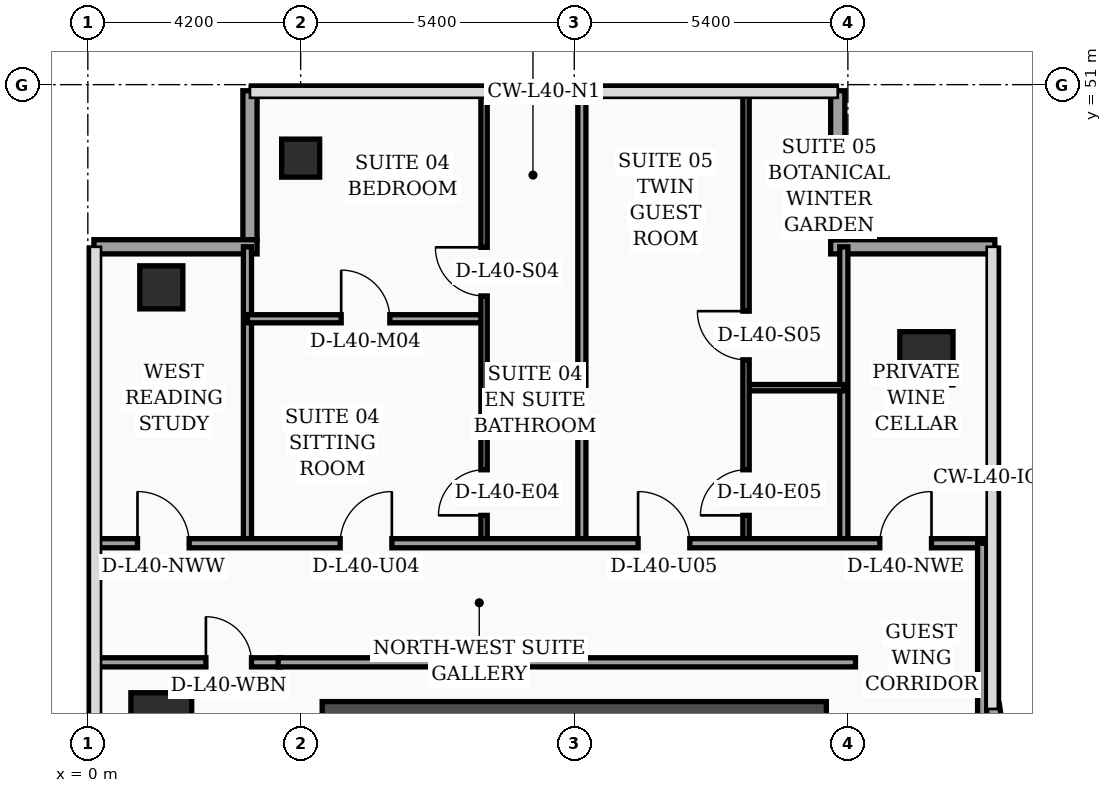
"""IFC4 building model, lengths in metres.
Left out: names, types, materials, properties, quantities, classifications, styles, units other than length and angle.
Written with IfcOpenShell. Run it as: python <this file> out.ifc"""

import sys

from ifc_helpers import new_model, si_unit, direction, frame, frame_2d, origin, origin_2d, place, context, subcontext, project, spatial, rectangle, hollow_rectangle, extrude, element, fill, save


model = new_model("IFC4")
c1 = context("Model", 3, precision=1e-05, world=origin(), true_north=direction((0.0, 1.0)))
c2 = subcontext(c1, "Body", "Model", "MODEL_VIEW")
j1 = project(units=[si_unit("LENGTHUNIT", "METRE"), si_unit("PLANEANGLEUNIT", "RADIAN")], contexts=[c1])
p1 = place(None, origin())
s1 = spatial("IfcSite", under=j1, at=p1, CompositionType="ELEMENT")
p2 = place(p1, origin())
s2 = spatial("IfcBuilding", under=s1, at=p2, CompositionType="ELEMENT")
p3 = place(p2, frame((0.0, 0.0, 163.7)))
s3 = spatial("IfcBuildingStorey", under=s2, at=p3, CompositionType="ELEMENT", Elevation=163.7)
p4 = place(p3, frame((4.625, 38.4, 0.0), z_axis=(0.0, 0.0, 1.0), x_axis=(1.0, 0.0, 0.0)))
e1 = element("IfcWall", 1, at=p4, inside=s3, PredefinedType="SHEAR", context=c2, shape_type="SweptSolid", body=[
    extrude(rectangle(XDim=9.95, YDim=0.85, at=frame_2d((4.975, 0.0))), origin(), (0.0, 0.0, 1.0), 3.56),
])
p5 = place(p3, frame((1.45, 38.4, 0.0), z_axis=(0.0, 0.0, 1.0), x_axis=(1.0, 0.0, 0.0)))
e2 = element("IfcColumn", 2, at=p5, inside=s3, PredefinedType="COLUMN", context=c2, shape_type="SweptSolid", body=[
    extrude(rectangle(XDim=1.2, YDim=1.2, at=origin_2d()), origin(), (0.0, 0.0, 1.0), 3.56),
])
p6 = place(p3, frame((1.45, 47.0, 0.0), z_axis=(0.0, 0.0, 1.0), x_axis=(1.0, 0.0, 0.0)))
e3 = element("IfcColumn", 3, at=p6, inside=s3, PredefinedType="COLUMN", context=c2, shape_type="SweptSolid", body=[
    extrude(hollow_rectangle(XDim=0.85, YDim=0.85, WallThickness=0.036, at=origin_2d()), origin(), (0.0, 0.0, 1.0), 3.56),
])
p7 = place(p3, frame((4.2, 49.55, 0.0), z_axis=(0.0, 0.0, 1.0), x_axis=(1.0, 0.0, 0.0)))
e4 = element("IfcColumn", 4, at=p7, inside=s3, PredefinedType="COLUMN", context=c2, shape_type="SweptSolid", body=[
    extrude(hollow_rectangle(XDim=0.75, YDim=0.75, WallThickness=0.032, at=origin_2d()), origin(), (0.0, 0.0, 1.0), 3.56),
])
p8 = place(p3, frame((16.55, 45.6, 0.0), z_axis=(0.0, 0.0, 1.0), x_axis=(1.0, 0.0, 0.0)))
e5 = element("IfcColumn", 5, at=p8, inside=s3, PredefinedType="COLUMN", context=c2, shape_type="SweptSolid", body=[
    extrude(rectangle(XDim=1.05, YDim=1.05, at=origin_2d()), origin(), (0.0, 0.0, 1.0), 3.56),
])
p9 = place(p3, frame((17.962, 38.03, 0.0), z_axis=(0.0, 0.0, 1.0), x_axis=(-0.15141125477, 0.988470855377, 0.0)))
e6 = element("IfcWall", 6, at=p9, inside=s3, PredefinedType="SOLIDWALL", context=c2, shape_type="SweptSolid", body=[
    extrude(rectangle(XDim=0.739, YDim=0.28, at=frame_2d((0.369, 0.0))), origin(), (0.0, 0.0, 1.0), 3.56),
])
p10 = place(p3, frame((17.9, 47.8, 0.0), z_axis=(0.0, 0.0, 1.0), x_axis=(-1.0, 0.0, 0.0)))
e7 = element("IfcWall", 7, at=p10, inside=s3, PredefinedType="SOLIDWALL", context=c2, shape_type="SweptSolid", body=[
    extrude(rectangle(XDim=3.24, YDim=0.28, at=frame_2d((1.62, 0.0))), origin(), (0.0, 0.0, 1.0), 3.56),
])
p11 = place(p3, frame((14.8, 47.94, 0.0), z_axis=(0.0, 0.0, 1.0), x_axis=(0.0, 1.0, 0.0)))
e8 = element("IfcWall", 8, at=p11, inside=s3, PredefinedType="SOLIDWALL", context=c2, shape_type="SweptSolid", body=[
    extrude(rectangle(XDim=2.94, YDim=0.28, at=frame_2d((1.47, 0.0))), origin(), (0.0, 0.0, 1.0), 3.56),
])
p12 = place(p3, frame((3.2, 50.88, 0.0), z_axis=(0.0, 0.0, 1.0), x_axis=(0.0, -1.0, 0.0)))
e9 = element("IfcWall", 9, at=p12, inside=s3, PredefinedType="SOLIDWALL", context=c2, shape_type="SweptSolid", body=[
    extrude(rectangle(XDim=2.94, YDim=0.28, at=frame_2d((1.47, 0.0))), origin(), (0.0, 0.0, 1.0), 3.04),
])
p13 = place(p3, frame((3.34, 47.8, 0.0), z_axis=(0.0, 0.0, 1.0), x_axis=(-1.0, 0.0, 0.0)))
e10 = element("IfcWall", 10, at=p13, inside=s3, PredefinedType="SOLIDWALL", context=c2, shape_type="SweptSolid", body=[
    extrude(rectangle(XDim=3.22, YDim=0.28, at=frame_2d((1.61, 0.0))), origin(), (0.0, 0.0, 1.0), 3.04),
])
p14 = place(p3, frame((0.08, 39.6, 0.0), z_axis=(0.0, 0.0, 1.0), x_axis=(1.0, 0.0, 0.0)))
e11 = element("IfcWall", 11, at=p14, inside=s3, PredefinedType="PARTITIONING", context=c2, shape_type="SweptSolid", body=[
    extrude(rectangle(XDim=3.725, YDim=0.18, at=frame_2d((1.862, 0.0))), origin(), (0.0, 0.0, 1.0), 2.94),
])
p15 = place(p14, frame((2.25, 0.0, 0.0)))
e12 = element("IfcOpeningElement", 12, at=p15, cuts=e11, PredefinedType="OPENING", context=c2, shape_type="SweptSolid", body=[
    extrude(rectangle(XDim=0.9, YDim=2.15, at=frame_2d((0.45, 1.075))), frame((0.0, 0.1, 0.0), z_axis=(0.0, -1.0, 0.0), x_axis=(1.0, 0.0, 0.0)), (0.0, 0.0, 1.0), 0.2),
])
p16 = place(p3, frame((3.15, 41.95, 0.0), z_axis=(0.0, 0.0, 1.0), x_axis=(0.0, 1.0, 0.0)))
e13 = element("IfcWall", 13, at=p16, inside=s3, PredefinedType="PARTITIONING", context=c2, shape_type="SweptSolid", body=[
    extrude(rectangle(XDim=5.85, YDim=0.16, at=frame_2d((2.925, 0.0))), origin(), (0.0, 0.0, 1.0), 3.14),
])
p17 = place(p3, frame((14.92, 41.95, 0.0), z_axis=(0.0, 0.0, 1.0), x_axis=(0.0, 1.0, 0.0)))
e14 = element("IfcWall", 14, at=p17, inside=s3, PredefinedType="PARTITIONING", context=c2, shape_type="SweptSolid", body=[
    extrude(rectangle(XDim=5.85, YDim=0.16, at=frame_2d((2.925, 0.0))), origin(), (0.0, 0.0, 1.0), 3.04),
])
p18 = place(p3, frame((7.82, 45.02, 0.0), z_axis=(0.0, 0.0, 1.0), x_axis=(1.0, 0.0, 0.0)))
e15 = element("IfcWall", 15, at=p18, inside=s3, PredefinedType="PARTITIONING", context=c2, shape_type="SweptSolid", body=[
    extrude(rectangle(XDim=1.93, YDim=0.125, at=frame_2d((0.965, 0.0))), origin(), (0.0, 0.0, 1.0), 3.56),
])
p19 = place(p3, frame((3.15, 46.38, 0.0), z_axis=(0.0, 0.0, 1.0), x_axis=(1.0, 0.0, 0.0)))
e16 = element("IfcWall", 16, at=p19, inside=s3, PredefinedType="PARTITIONING", context=c2, shape_type="SweptSolid", body=[
    extrude(rectangle(XDim=4.67, YDim=0.16, at=frame_2d((2.335, 0.0))), origin(), (0.0, 0.0, 1.0), 2.94),
])
p20 = place(p19, frame((1.85, 0.0, 0.0)))
e17 = element("IfcOpeningElement", 17, at=p20, cuts=e16, PredefinedType="OPENING", context=c2, shape_type="SweptSolid", body=[
    extrude(rectangle(XDim=0.96, YDim=2.2, at=frame_2d((0.48, 1.1))), frame((0.0, 0.09, 0.0), z_axis=(0.0, -1.0, 0.0), x_axis=(1.0, 0.0, 0.0)), (0.0, 0.0, 1.0), 0.18),
])
p21 = place(p3, frame((7.82, 41.95, 0.0), z_axis=(0.0, 0.0, 1.0), x_axis=(0.0, 1.0, 0.0)))
e18 = element("IfcWall", 18, at=p21, inside=s3, PredefinedType="PARTITIONING", context=c2, shape_type="SweptSolid", body=[
    extrude(rectangle(XDim=8.99, YDim=0.125, at=frame_2d((4.495, 0.0))), origin(), (0.0, 0.0, 1.0), 3.04),
])
p22 = place(p21, frame((0.55, 0.0, 0.0)))
e19 = element("IfcOpeningElement", 19, at=p22, cuts=e18, PredefinedType="OPENING", context=c2, shape_type="SweptSolid", body=[
    extrude(rectangle(XDim=0.9, YDim=2.15, at=frame_2d((0.45, 1.075))), frame((0.0, 0.073, 0.0), z_axis=(0.0, -1.0, 0.0), x_axis=(1.0, 0.0, 0.0)), (0.0, 0.0, 1.0), 0.145),
])
p23 = place(p21, frame((4.88, 0.0, 0.0)))
e20 = element("IfcOpeningElement", 20, at=p23, cuts=e18, PredefinedType="OPENING", context=c2, shape_type="SweptSolid", body=[
    extrude(rectangle(XDim=0.96, YDim=2.2, at=frame_2d((0.48, 1.1))), frame((0.0, 0.073, 0.0), z_axis=(0.0, -1.0, 0.0), x_axis=(1.0, 0.0, 0.0)), (0.0, 0.0, 1.0), 0.145),
])
p24 = place(p3, frame((12.99, 45.02, 0.0), z_axis=(0.0, 0.0, 1.0), x_axis=(1.0, 0.0, 0.0)))
e21 = element("IfcWall", 21, at=p24, inside=s3, PredefinedType="PARTITIONING", context=c2, shape_type="SweptSolid", body=[
    extrude(rectangle(XDim=1.93, YDim=0.125, at=frame_2d((0.965, 0.0))), origin(), (0.0, 0.0, 1.0), 3.56),
])
p25 = place(p3, frame((12.99, 41.95, 0.0), z_axis=(0.0, 0.0, 1.0), x_axis=(0.0, 1.0, 0.0)))
e22 = element("IfcWall", 22, at=p25, inside=s3, PredefinedType="PARTITIONING", context=c2, shape_type="SweptSolid", body=[
    extrude(rectangle(XDim=8.99, YDim=0.125, at=frame_2d((4.495, 0.0))), origin(), (0.0, 0.0, 1.0), 3.04),
])
p26 = place(p25, frame((0.55, 0.0, 0.0)))
e23 = element("IfcOpeningElement", 23, at=p26, cuts=e22, PredefinedType="OPENING", context=c2, shape_type="SweptSolid", body=[
    extrude(rectangle(XDim=0.9, YDim=2.15, at=frame_2d((0.45, 1.075))), frame((0.0, 0.073, 0.0), z_axis=(0.0, -1.0, 0.0), x_axis=(1.0, 0.0, 0.0)), (0.0, 0.0, 1.0), 0.145),
])
p27 = place(p25, frame((3.62, 0.0, 0.0)))
e24 = element("IfcOpeningElement", 24, at=p27, cuts=e22, PredefinedType="OPENING", context=c2, shape_type="SweptSolid", body=[
    extrude(rectangle(XDim=0.96, YDim=2.2, at=frame_2d((0.48, 1.1))), frame((0.0, 0.073, 0.0), z_axis=(0.0, -1.0, 0.0), x_axis=(1.0, 0.0, 0.0)), (0.0, 0.0, 1.0), 0.145),
])
p28 = place(p3, frame((9.75, 41.95, 0.0), z_axis=(0.0, 0.0, 1.0), x_axis=(0.0, 1.0, 0.0)))
e25 = element("IfcWall", 25, at=p28, inside=s3, PredefinedType="PARTITIONING", context=c2, shape_type="SweptSolid", body=[
    extrude(rectangle(XDim=8.99, YDim=0.16, at=frame_2d((4.495, 0.0))), origin(), (0.0, 0.0, 1.0), 3.04),
])
p29 = place(p3, frame((0.08, 41.95, 0.0), z_axis=(0.0, 0.0, 1.0), x_axis=(1.0, 0.0, 0.0)))
e26 = element("IfcWall", 26, at=p29, inside=s3, PredefinedType="PARTITIONING", context=c2, shape_type="SweptSolid", body=[
    extrude(rectangle(XDim=17.77, YDim=0.18, at=frame_2d((8.885, 0.0))), origin(), (0.0, 0.0, 1.0), 2.94),
])
p30 = place(p29, frame((0.9, 0.0, 0.0)))
e27 = element("IfcOpeningElement", 27, at=p30, cuts=e26, PredefinedType="OPENING", context=c2, shape_type="SweptSolid", body=[
    extrude(rectangle(XDim=1.02, YDim=2.2, at=frame_2d((0.51, 1.1))), frame((0.0, 0.1, 0.0), z_axis=(0.0, -1.0, 0.0), x_axis=(1.0, 0.0, 0.0)), (0.0, 0.0, 1.0), 0.2),
])
p31 = place(p29, frame((4.9, 0.0, 0.0)))
e28 = element("IfcOpeningElement", 28, at=p31, cuts=e26, PredefinedType="OPENING", context=c2, shape_type="SweptSolid", body=[
    extrude(rectangle(XDim=1.02, YDim=2.2, at=frame_2d((0.51, 1.1))), frame((0.0, 0.1, 0.0), z_axis=(0.0, -1.0, 0.0), x_axis=(1.0, 0.0, 0.0)), (0.0, 0.0, 1.0), 0.2),
])
p32 = place(p29, frame((10.78, 0.0, 0.0)))
e29 = element("IfcOpeningElement", 29, at=p32, cuts=e26, PredefinedType="OPENING", context=c2, shape_type="SweptSolid", body=[
    extrude(rectangle(XDim=1.02, YDim=2.2, at=frame_2d((0.51, 1.1))), frame((0.0, 0.1, 0.0), z_axis=(0.0, -1.0, 0.0), x_axis=(1.0, 0.0, 0.0)), (0.0, 0.0, 1.0), 0.2),
])
p33 = place(p29, frame((15.55, 0.0, 0.0)))
e30 = element("IfcOpeningElement", 30, at=p33, cuts=e26, PredefinedType="OPENING", context=c2, shape_type="SweptSolid", body=[
    extrude(rectangle(XDim=1.02, YDim=2.2, at=frame_2d((0.51, 1.1))), frame((0.0, 0.1, 0.0), z_axis=(0.0, -1.0, 0.0), x_axis=(1.0, 0.0, 0.0)), (0.0, 0.0, 1.0), 0.2),
])
p34 = place(p3, frame((17.65, 24.3, 0.0), z_axis=(0.0, 0.0, 1.0), x_axis=(0.0, 1.0, 0.0)))
e31 = element("IfcWall", 31, at=p34, inside=s3, PredefinedType="PARTITIONING", context=c2, shape_type="SweptSolid", body=[
    extrude(rectangle(XDim=17.65, YDim=0.18, at=frame_2d((8.825, 0.0))), origin(), (0.0, 0.0, 1.0), 2.94),
])
p35 = place(p3, frame((3.755, 39.6, 0.0), z_axis=(0.0, 0.0, 1.0), x_axis=(1.0, 0.0, 0.0)))
e32 = element("IfcWall", 32, at=p35, inside=s3, PredefinedType="PARTITIONING", context=c2, shape_type="SweptSolid", body=[
    extrude(rectangle(XDim=11.395, YDim=0.18, at=frame_2d((5.698, 0.0))), origin(), (0.0, 0.0, 1.0), 2.94),
])
p36 = place(p15, origin())
e33 = element("IfcDoor", 33, at=p36, inside=s3, OperationType="SINGLE_SWING_LEFT", PredefinedType="DOOR", context=c2, shape_type="SweptSolid", body=[
    extrude(rectangle(XDim=0.9, YDim=2.15, at=frame_2d((0.45, 1.075))), frame((0.0, 0.025, 0.0), z_axis=(0.0, -1.0, 0.0), x_axis=(1.0, 0.0, 0.0)), (0.0, 0.0, 1.0), 0.05),
])
fill(e12, e33)
p37 = place(p20, origin())
e34 = element("IfcDoor", 34, at=p37, inside=s3, OperationType="SINGLE_SWING_LEFT", PredefinedType="DOOR", context=c2, shape_type="SweptSolid", body=[
    extrude(rectangle(XDim=0.96, YDim=2.2, at=frame_2d((0.48, 1.1))), frame((0.0, 0.025, 0.0), z_axis=(0.0, -1.0, 0.0), x_axis=(1.0, 0.0, 0.0)), (0.0, 0.0, 1.0), 0.05),
])
fill(e17, e34)
p38 = place(p22, origin())
e35 = element("IfcDoor", 35, at=p38, inside=s3, OperationType="SINGLE_SWING_LEFT", PredefinedType="DOOR", context=c2, shape_type="SweptSolid", body=[
    extrude(rectangle(XDim=0.9, YDim=2.15, at=frame_2d((0.45, 1.075))), frame((0.0, 0.025, 0.0), z_axis=(0.0, -1.0, 0.0), x_axis=(1.0, 0.0, 0.0)), (0.0, 0.0, 1.0), 0.05),
])
fill(e19, e35)
p39 = place(p23, origin())
e36 = element("IfcDoor", 36, at=p39, inside=s3, OperationType="SINGLE_SWING_RIGHT", PredefinedType="DOOR", context=c2, shape_type="SweptSolid", body=[
    extrude(rectangle(XDim=0.96, YDim=2.2, at=frame_2d((0.48, 1.1))), frame((0.0, 0.025, 0.0), z_axis=(0.0, -1.0, 0.0), x_axis=(1.0, 0.0, 0.0)), (0.0, 0.0, 1.0), 0.05),
])
fill(e20, e36)
p40 = place(p26, origin())
e37 = element("IfcDoor", 37, at=p40, inside=s3, OperationType="SINGLE_SWING_LEFT", PredefinedType="DOOR", context=c2, shape_type="SweptSolid", body=[
    extrude(rectangle(XDim=0.9, YDim=2.15, at=frame_2d((0.45, 1.075))), frame((0.0, 0.025, 0.0), z_axis=(0.0, -1.0, 0.0), x_axis=(1.0, 0.0, 0.0)), (0.0, 0.0, 1.0), 0.05),
])
fill(e23, e37)
p41 = place(p27, origin())
e38 = element("IfcDoor", 38, at=p41, inside=s3, OperationType="SINGLE_SWING_RIGHT", PredefinedType="DOOR", context=c2, shape_type="SweptSolid", body=[
    extrude(rectangle(XDim=0.96, YDim=2.2, at=frame_2d((0.48, 1.1))), frame((0.0, 0.025, 0.0), z_axis=(0.0, -1.0, 0.0), x_axis=(1.0, 0.0, 0.0)), (0.0, 0.0, 1.0), 0.05),
])
fill(e24, e38)
p42 = place(p30, origin())
e39 = element("IfcDoor", 39, at=p42, inside=s3, OperationType="SINGLE_SWING_LEFT", PredefinedType="DOOR", context=c2, shape_type="SweptSolid", body=[
    extrude(rectangle(XDim=1.02, YDim=2.2, at=frame_2d((0.51, 1.1))), frame((0.0, 0.025, 0.0), z_axis=(0.0, -1.0, 0.0), x_axis=(1.0, 0.0, 0.0)), (0.0, 0.0, 1.0), 0.05),
])
fill(e27, e39)
p43 = place(p31, origin())
e40 = element("IfcDoor", 40, at=p43, inside=s3, OperationType="SINGLE_SWING_RIGHT", PredefinedType="DOOR", context=c2, shape_type="SweptSolid", body=[
    extrude(rectangle(XDim=1.02, YDim=2.2, at=frame_2d((0.51, 1.1))), frame((0.0, 0.025, 0.0), z_axis=(0.0, -1.0, 0.0), x_axis=(1.0, 0.0, 0.0)), (0.0, 0.0, 1.0), 0.05),
])
fill(e28, e40)
p44 = place(p32, origin())
e41 = element("IfcDoor", 41, at=p44, inside=s3, OperationType="SINGLE_SWING_LEFT", PredefinedType="DOOR", context=c2, shape_type="SweptSolid", body=[
    extrude(rectangle(XDim=1.02, YDim=2.2, at=frame_2d((0.51, 1.1))), frame((0.0, 0.025, 0.0), z_axis=(0.0, -1.0, 0.0), x_axis=(1.0, 0.0, 0.0)), (0.0, 0.0, 1.0), 0.05),
])
fill(e29, e41)
p45 = place(p33, origin())
e42 = element("IfcDoor", 42, at=p45, inside=s3, OperationType="SINGLE_SWING_RIGHT", PredefinedType="DOOR", context=c2, shape_type="SweptSolid", body=[
    extrude(rectangle(XDim=1.02, YDim=2.2, at=frame_2d((0.51, 1.1))), frame((0.0, 0.025, 0.0), z_axis=(0.0, -1.0, 0.0), x_axis=(1.0, 0.0, 0.0)), (0.0, 0.0, 1.0), 0.05),
])
fill(e30, e42)
save(model, sys.argv[1])
